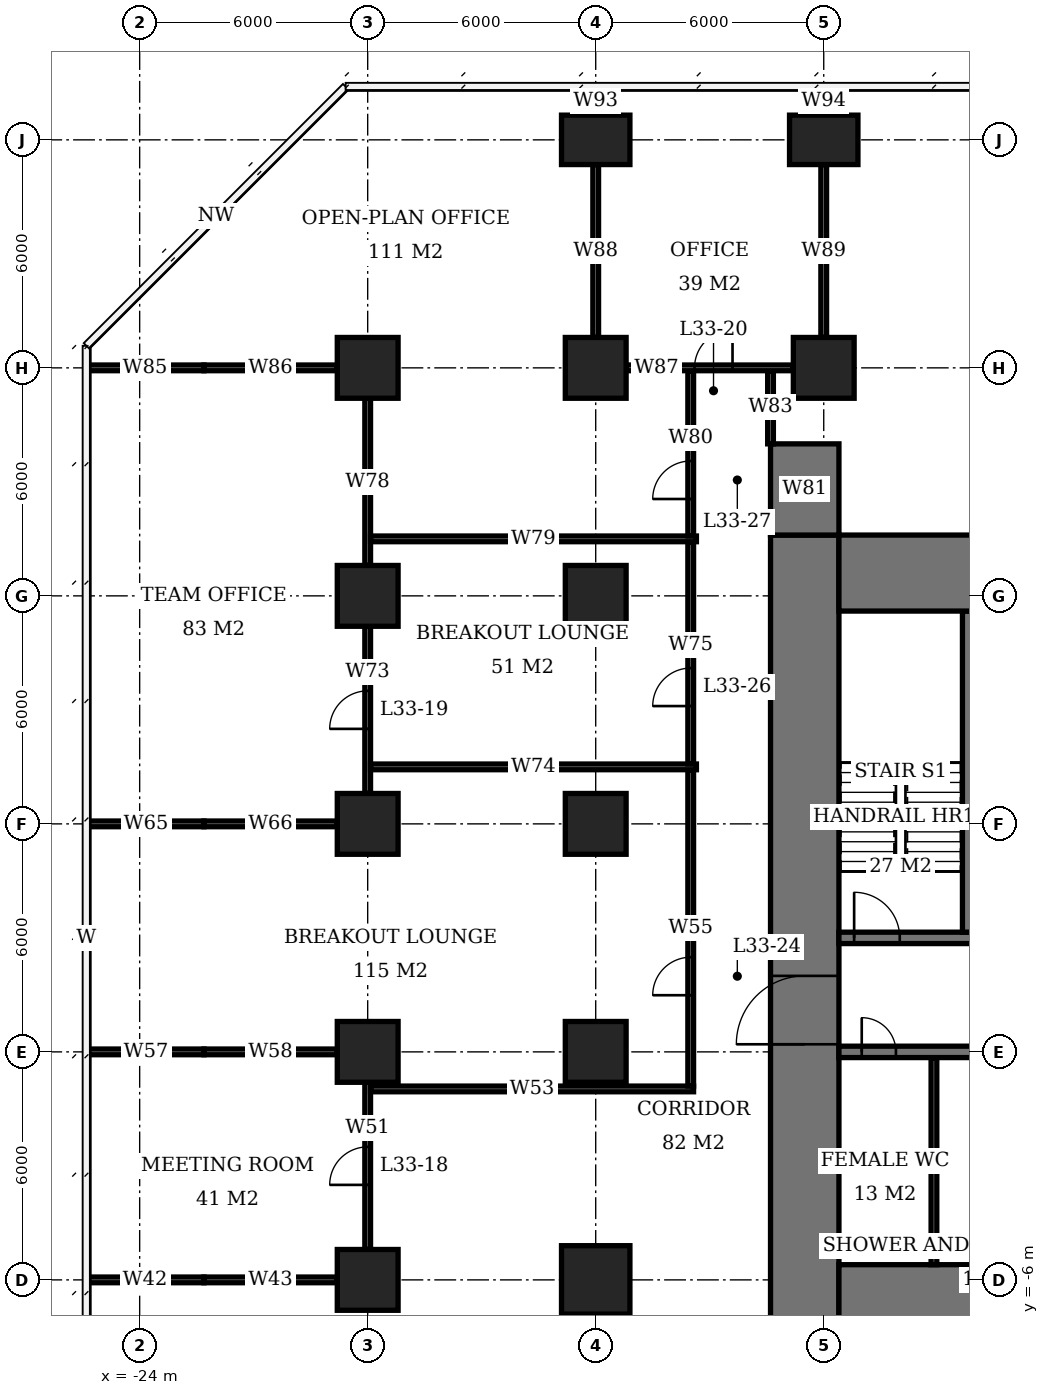
"""IFC4 building model, lengths in metres.
Left out: names, types, materials, properties, quantities, classifications, styles, units other than length and angle.
Written with IfcOpenShell. Run it as: python <this file> out.ifc"""

import sys

from ifc_helpers import new_model, si_unit, direction, frame, frame_2d, origin, origin_2d, place, context, subcontext, project, spatial, rectangle, extrude, element, fill, save


model = new_model("IFC4")
c1 = context("Model", 3, precision=1e-05, world=origin(), true_north=direction((0.0, 1.0)))
c2 = subcontext(c1, "Body", "Model", "MODEL_VIEW")
j1 = project(units=[si_unit("LENGTHUNIT", "METRE"), si_unit("PLANEANGLEUNIT", "RADIAN")], contexts=[c1])
p1 = place(None, origin())
s1 = spatial("IfcSite", under=j1, at=p1, CompositionType="ELEMENT")
p2 = place(p1, origin())
s2 = spatial("IfcBuilding", under=s1, at=p2, CompositionType="ELEMENT")
p3 = place(p2, frame((0.0, 0.0, 136.7)))
s3 = spatial("IfcBuildingStorey", under=s2, at=p3, CompositionType="ELEMENT", Elevation=136.7)
for number, where, z_axis, x_axis in (
    (1, (-18.0, -6.0, 0.0), (0.0, 0.0, 1.0), (1.0, 0.0, 0.0)),
    (2, (-18.0, 0.0, 0.0), (0.0, 0.0, 1.0), (1.0, 0.0, 0.0)),
    (3, (-18.0, 6.0, 0.0), (0.0, 0.0, 1.0), (1.0, 0.0, 0.0)),
    (4, (-18.0, 12.0, 0.0), (0.0, 0.0, 1.0), (1.0, 0.0, 0.0)),
    (5, (-18.0, 18.0, 0.0), (0.0, 0.0, 1.0), (1.0, 0.0, 0.0)),
):
    element("IfcColumn", number, at=place(p3, frame(where, z_axis=z_axis, x_axis=x_axis)), inside=s3, PredefinedType="COLUMN", context=c2, shape_type="SweptSolid", body=[
        extrude(rectangle(XDim=1.6, YDim=1.6, at=origin_2d()), origin(), (0.0, 0.0, 1.0), 3.9),
    ])
p4 = place(p3, frame((-12.0, -6.0, 0.0), z_axis=(0.0, 0.0, 1.0), x_axis=(1.0, 0.0, 0.0)))
e6 = element("IfcColumn", 6, at=p4, inside=s3, PredefinedType="COLUMN", context=c2, shape_type="SweptSolid", body=[
    extrude(rectangle(XDim=1.8, YDim=1.8, at=origin_2d()), origin(), (0.0, 0.0, 1.0), 3.9),
])
for number, where, z_axis, x_axis in (
    (7, (-12.0, 0.0, 0.0), (0.0, 0.0, 1.0), (1.0, 0.0, 0.0)),
    (8, (-12.0, 6.0, 0.0), (0.0, 0.0, 1.0), (1.0, 0.0, 0.0)),
    (9, (-12.0, 12.0, 0.0), (0.0, 0.0, 1.0), (1.0, 0.0, 0.0)),
    (10, (-12.0, 18.0, 0.0), (0.0, 0.0, 1.0), (1.0, 0.0, 0.0)),
):
    element("IfcColumn", number, at=place(p3, frame(where, z_axis=z_axis, x_axis=x_axis)), inside=s3, PredefinedType="COLUMN", context=c2, shape_type="SweptSolid", body=[
        extrude(rectangle(XDim=1.6, YDim=1.6, at=origin_2d()), origin(), (0.0, 0.0, 1.0), 3.9),
    ])
p5 = place(p3, frame((-12.0, 24.0, 0.0), z_axis=(0.0, 0.0, 1.0), x_axis=(1.0, 0.0, 0.0)))
e11 = element("IfcColumn", 11, at=p5, inside=s3, PredefinedType="COLUMN", context=c2, shape_type="SweptSolid", body=[
    extrude(rectangle(XDim=1.8, YDim=1.3, at=origin_2d()), origin(), (0.0, 0.0, 1.0), 3.9),
])
p6 = place(p3, frame((-6.0, 18.0, 0.0), z_axis=(0.0, 0.0, 1.0), x_axis=(1.0, 0.0, 0.0)))
e12 = element("IfcColumn", 12, at=p6, inside=s3, PredefinedType="COLUMN", context=c2, shape_type="SweptSolid", body=[
    extrude(rectangle(XDim=1.6, YDim=1.6, at=origin_2d()), origin(), (0.0, 0.0, 1.0), 3.9),
])
p7 = place(p3, frame((-6.0, 24.0, 0.0), z_axis=(0.0, 0.0, 1.0), x_axis=(1.0, 0.0, 0.0)))
e13 = element("IfcColumn", 13, at=p7, inside=s3, PredefinedType="COLUMN", context=c2, shape_type="SweptSolid", body=[
    extrude(rectangle(XDim=1.8, YDim=1.3, at=origin_2d()), origin(), (0.0, 0.0, 1.0), 3.9),
])
for number, where, z_axis, x_axis in (
    (14, (-5.6, -6.6, 0.0), (0.0, 0.0, 1.0), (1.0, 0.0, 0.0)),
    (15, (-5.6, 12.6, 0.0), (0.0, 0.0, 1.0), (1.0, 0.0, 0.0)),
):
    element("IfcWall", number, at=place(p3, frame(where, z_axis=z_axis, x_axis=x_axis)), inside=s3, PredefinedType="SHEAR", context=c2, shape_type="SweptSolid", body=[
        extrude(rectangle(XDim=23.2, YDim=2.0, at=frame_2d((11.6, 0.0))), origin(), (0.0, 0.0, 1.0), 3.9),
    ])
p8 = place(p3, frame((-6.5, -7.6, 0.0), z_axis=(0.0, 0.0, 1.0), x_axis=(0.0, 1.0, 0.0)))
e16 = element("IfcWall", 16, at=p8, inside=s3, PredefinedType="SHEAR", context=c2, shape_type="SweptSolid", body=[
    extrude(rectangle(XDim=21.2, YDim=1.8, at=frame_2d((10.6, 0.0))), origin(), (0.0, 0.0, 1.0), 3.9),
])
p9 = place(p8, frame((7.8, 0.0, 0.0)))
e17 = element("IfcOpeningElement", 17, at=p9, cuts=e16, PredefinedType="OPENING", context=c2, shape_type="SweptSolid", body=[
    extrude(rectangle(XDim=1.8, YDim=2.4, at=frame_2d((0.9, 1.2))), frame((0.0, 0.91, 0.0), z_axis=(0.0, -1.0, 0.0), x_axis=(1.0, 0.0, 0.0)), (0.0, 0.0, 1.0), 1.82),
])
p10 = place(p3, frame((-6.5, 13.6, 0.0), z_axis=(0.0, 0.0, 1.0), x_axis=(0.0, 1.0, 0.0)))
e18 = element("IfcWall", 18, at=p10, inside=s3, PredefinedType="SHEAR", context=c2, shape_type="SweptSolid", body=[
    extrude(rectangle(XDim=2.4, YDim=1.8, at=frame_2d((1.2, 0.0))), origin(), (0.0, 0.0, 1.0), 3.9),
])
p11 = place(p3, frame((-5.6, 0.0, 0.0), z_axis=(0.0, 0.0, 1.0), x_axis=(1.0, 0.0, 0.0)))
e19 = element("IfcWall", 19, at=p11, inside=s3, PredefinedType="SHEAR", context=c2, shape_type="SweptSolid", body=[
    extrude(rectangle(XDim=17.75, YDim=0.3, at=frame_2d((8.875, 0.0))), origin(), (0.0, 0.0, 1.0), 3.9),
])
p12 = place(p11, frame((0.6, 0.0, 0.0)))
e20 = element("IfcOpeningElement", 20, at=p12, cuts=e19, PredefinedType="OPENING", context=c2, shape_type="SweptSolid", body=[
    extrude(rectangle(XDim=0.9, YDim=2.1, at=frame_2d((0.45, 1.05))), frame((0.0, 0.16, 0.0), z_axis=(0.0, -1.0, 0.0), x_axis=(1.0, 0.0, 0.0)), (0.0, 0.0, 1.0), 0.32),
])
p13 = place(p11, frame((3.7, 0.0, 0.0)))
e21 = element("IfcOpeningElement", 21, at=p13, cuts=e19, PredefinedType="OPENING", context=c2, shape_type="SweptSolid", body=[
    extrude(rectangle(XDim=0.9, YDim=2.1, at=frame_2d((0.45, 1.05))), frame((0.0, 0.16, 0.0), z_axis=(0.0, -1.0, 0.0), x_axis=(1.0, 0.0, 0.0)), (0.0, 0.0, 1.0), 0.32),
])
p14 = place(p11, frame((6.55, 0.0, 0.0)))
e22 = element("IfcOpeningElement", 22, at=p14, cuts=e19, PredefinedType="OPENING", context=c2, shape_type="SweptSolid", body=[
    extrude(rectangle(XDim=1.1, YDim=2.1, at=frame_2d((0.55, 1.05))), frame((0.0, 0.16, 0.0), z_axis=(0.0, -1.0, 0.0), x_axis=(1.0, 0.0, 0.0)), (0.0, 0.0, 1.0), 0.32),
])
p15 = place(p11, frame((9.55, 0.0, 0.0)))
e23 = element("IfcOpeningElement", 23, at=p15, cuts=e19, PredefinedType="OPENING", context=c2, shape_type="SweptSolid", body=[
    extrude(rectangle(XDim=1.1, YDim=2.1, at=frame_2d((0.55, 1.05))), frame((0.0, 0.16, 0.0), z_axis=(0.0, -1.0, 0.0), x_axis=(1.0, 0.0, 0.0)), (0.0, 0.0, 1.0), 0.32),
])
p16 = place(p3, frame((-5.6, 3.0, 0.0), z_axis=(0.0, 0.0, 1.0), x_axis=(1.0, 0.0, 0.0)))
e24 = element("IfcWall", 24, at=p16, inside=s3, PredefinedType="SHEAR", context=c2, shape_type="SweptSolid", body=[
    extrude(rectangle(XDim=5.45, YDim=0.3, at=frame_2d((2.725, 0.0))), origin(), (0.0, 0.0, 1.0), 3.9),
])
p17 = place(p16, frame((0.4, 0.0, 0.0)))
e25 = element("IfcOpeningElement", 25, at=p17, cuts=e24, PredefinedType="OPENING", context=c2, shape_type="SweptSolid", body=[
    extrude(rectangle(XDim=1.2, YDim=2.1, at=frame_2d((0.6, 1.05))), frame((0.0, 0.16, 0.0), z_axis=(0.0, -1.0, 0.0), x_axis=(1.0, 0.0, 0.0)), (0.0, 0.0, 1.0), 0.32),
])
p18 = place(p16, frame((3.95, 0.0, 0.0)))
e26 = element("IfcOpeningElement", 26, at=p18, cuts=e24, PredefinedType="OPENING", context=c2, shape_type="SweptSolid", body=[
    extrude(rectangle(XDim=0.9, YDim=2.1, at=frame_2d((0.45, 1.05))), frame((0.0, 0.16, 0.0), z_axis=(0.0, -1.0, 0.0), x_axis=(1.0, 0.0, 0.0)), (0.0, 0.0, 1.0), 0.32),
])
p19 = place(p3, frame((-2.2, 3.15, 0.0), z_axis=(0.0, 0.0, 1.0), x_axis=(0.0, 1.0, 0.0)))
e27 = element("IfcWall", 27, at=p19, inside=s3, PredefinedType="SHEAR", context=c2, shape_type="SweptSolid", body=[
    extrude(rectangle(XDim=8.45, YDim=0.3, at=frame_2d((4.225, 0.0))), origin(), (0.0, 0.0, 1.0), 3.9),
])
p20 = place(p3, frame((-3.1, -5.6, 0.0), z_axis=(0.0, 0.0, 1.0), x_axis=(0.0, 1.0, 0.0)))
e28 = element("IfcWall", 28, at=p20, inside=s3, PredefinedType="PLUMBINGWALL", context=c2, shape_type="SweptSolid", body=[
    extrude(rectangle(XDim=5.45, YDim=0.15, at=frame_2d((2.725, 0.0))), origin(), (0.0, 0.0, 1.0), 3.65),
])
p21 = place(p3, frame((-25.4, -6.0, 0.0), z_axis=(0.0, 0.0, 1.0), x_axis=(1.0, 0.0, 0.0)))
e29 = element("IfcWall", 29, at=p21, inside=s3, PredefinedType="PARTITIONING", context=c2, shape_type="SweptSolid", body=[
    extrude(rectangle(XDim=3.09, YDim=0.15, at=frame_2d((1.545, 0.0))), origin(), (0.0, 0.0, 1.0), 3.65),
])
p22 = place(p3, frame((-22.31, -6.0, 0.0), z_axis=(0.0, 0.0, 1.0), x_axis=(1.0, 0.0, 0.0)))
e30 = element("IfcWall", 30, at=p22, inside=s3, PredefinedType="PARTITIONING", context=c2, shape_type="SweptSolid", body=[
    extrude(rectangle(XDim=3.51, YDim=0.15, at=frame_2d((1.755, 0.0))), origin(), (0.0, 0.0, 1.0), 2.65),
])
p23 = place(p3, frame((-25.35, 0.0, 0.0), z_axis=(0.0, 0.0, 1.0), x_axis=(1.0, 0.0, 0.0)))
e31 = element("IfcWall", 31, at=p23, inside=s3, PredefinedType="PARTITIONING", context=c2, shape_type="SweptSolid", body=[
    extrude(rectangle(XDim=3.04, YDim=0.15, at=frame_2d((1.52, 0.0))), origin(), (0.0, 0.0, 1.0), 3.65),
])
p24 = place(p3, frame((-22.31, 0.0, 0.0), z_axis=(0.0, 0.0, 1.0), x_axis=(1.0, 0.0, 0.0)))
e32 = element("IfcWall", 32, at=p24, inside=s3, PredefinedType="PARTITIONING", context=c2, shape_type="SweptSolid", body=[
    extrude(rectangle(XDim=3.51, YDim=0.15, at=frame_2d((1.755, 0.0))), origin(), (0.0, 0.0, 1.0), 2.65),
])
p25 = place(p3, frame((-25.35, 6.0, 0.0), z_axis=(0.0, 0.0, 1.0), x_axis=(1.0, 0.0, 0.0)))
e33 = element("IfcWall", 33, at=p25, inside=s3, PredefinedType="PARTITIONING", context=c2, shape_type="SweptSolid", body=[
    extrude(rectangle(XDim=3.04, YDim=0.15, at=frame_2d((1.52, 0.0))), origin(), (0.0, 0.0, 1.0), 3.65),
])
p26 = place(p3, frame((-22.31, 6.0, 0.0), z_axis=(0.0, 0.0, 1.0), x_axis=(1.0, 0.0, 0.0)))
e34 = element("IfcWall", 34, at=p26, inside=s3, PredefinedType="PARTITIONING", context=c2, shape_type="SweptSolid", body=[
    extrude(rectangle(XDim=3.51, YDim=0.15, at=frame_2d((1.755, 0.0))), origin(), (0.0, 0.0, 1.0), 2.65),
])
p27 = place(p3, frame((-25.4, 18.0, 0.0), z_axis=(0.0, 0.0, 1.0), x_axis=(1.0, 0.0, 0.0)))
e35 = element("IfcWall", 35, at=p27, inside=s3, PredefinedType="PARTITIONING", context=c2, shape_type="SweptSolid", body=[
    extrude(rectangle(XDim=3.09, YDim=0.15, at=frame_2d((1.545, 0.0))), origin(), (0.0, 0.0, 1.0), 3.65),
])
p28 = place(p3, frame((-22.31, 18.0, 0.0), z_axis=(0.0, 0.0, 1.0), x_axis=(1.0, 0.0, 0.0)))
e36 = element("IfcWall", 36, at=p28, inside=s3, PredefinedType="PARTITIONING", context=c2, shape_type="SweptSolid", body=[
    extrude(rectangle(XDim=3.51, YDim=0.15, at=frame_2d((1.755, 0.0))), origin(), (0.0, 0.0, 1.0), 2.65),
])
p29 = place(p3, frame((-11.2, 18.0, 0.0), z_axis=(0.0, 0.0, 1.0), x_axis=(1.0, 0.0, 0.0)))
e37 = element("IfcWall", 37, at=p29, inside=s3, PredefinedType="PARTITIONING", context=c2, shape_type="SweptSolid", body=[
    extrude(rectangle(XDim=4.4, YDim=0.15, at=frame_2d((2.2, 0.0))), origin(), (0.0, 0.0, 1.0), 3.65),
])
p30 = place(p29, frame((1.8, 0.0, 0.0)))
e38 = element("IfcOpeningElement", 38, at=p30, cuts=e37, PredefinedType="OPENING", context=c2, shape_type="SweptSolid", body=[
    extrude(rectangle(XDim=1.0, YDim=2.1, at=frame_2d((0.5, 1.05))), frame((0.0, 0.085, 0.0), z_axis=(0.0, -1.0, 0.0), x_axis=(1.0, 0.0, 0.0)), (0.0, 0.0, 1.0), 0.17),
])
p31 = place(p3, frame((-18.0, -5.2, 0.0), z_axis=(0.0, 0.0, 1.0), x_axis=(0.0, 1.0, 0.0)))
e39 = element("IfcWall", 39, at=p31, inside=s3, PredefinedType="PARTITIONING", context=c2, shape_type="SweptSolid", body=[
    extrude(rectangle(XDim=4.4, YDim=0.15, at=frame_2d((2.2, 0.0))), origin(), (0.0, 0.0, 1.0), 3.65),
])
p32 = place(p31, frame((1.7, 0.0, 0.0)))
e40 = element("IfcOpeningElement", 40, at=p32, cuts=e39, PredefinedType="OPENING", context=c2, shape_type="SweptSolid", body=[
    extrude(rectangle(XDim=1.0, YDim=2.1, at=frame_2d((0.5, 1.05))), frame((0.0, 0.085, 0.0), z_axis=(0.0, -1.0, 0.0), x_axis=(1.0, 0.0, 0.0)), (0.0, 0.0, 1.0), 0.17),
])
p33 = place(p3, frame((-18.0, 6.8, 0.0), z_axis=(0.0, 0.0, 1.0), x_axis=(0.0, 1.0, 0.0)))
e41 = element("IfcWall", 41, at=p33, inside=s3, PredefinedType="PARTITIONING", context=c2, shape_type="SweptSolid", body=[
    extrude(rectangle(XDim=4.4, YDim=0.15, at=frame_2d((2.2, 0.0))), origin(), (0.0, 0.0, 1.0), 3.65),
])
p34 = place(p33, frame((1.7, 0.0, 0.0)))
e42 = element("IfcOpeningElement", 42, at=p34, cuts=e41, PredefinedType="OPENING", context=c2, shape_type="SweptSolid", body=[
    extrude(rectangle(XDim=1.0, YDim=2.1, at=frame_2d((0.5, 1.05))), frame((0.0, 0.085, 0.0), z_axis=(0.0, -1.0, 0.0), x_axis=(1.0, 0.0, 0.0)), (0.0, 0.0, 1.0), 0.17),
])
p35 = place(p3, frame((-18.0, 12.8, 0.0), z_axis=(0.0, 0.0, 1.0), x_axis=(0.0, 1.0, 0.0)))
e43 = element("IfcWall", 43, at=p35, inside=s3, PredefinedType="PARTITIONING", context=c2, shape_type="SweptSolid", body=[
    extrude(rectangle(XDim=4.4, YDim=0.15, at=frame_2d((2.2, 0.0))), origin(), (0.0, 0.0, 1.0), 3.65),
])
p36 = place(p3, frame((-12.0, 18.8, 0.0), z_axis=(0.0, 0.0, 1.0), x_axis=(0.0, 1.0, 0.0)))
e44 = element("IfcWall", 44, at=p36, inside=s3, PredefinedType="PARTITIONING", context=c2, shape_type="SweptSolid", body=[
    extrude(rectangle(XDim=4.55, YDim=0.15, at=frame_2d((2.275, 0.0))), origin(), (0.0, 0.0, 1.0), 3.65),
])
p37 = place(p3, frame((-12.0, 24.65, 0.0), z_axis=(0.0, 0.0, 1.0), x_axis=(0.0, 1.0, 0.0)))
e45 = element("IfcWall", 45, at=p37, inside=s3, PredefinedType="PARTITIONING", context=c2, shape_type="SweptSolid", body=[
    extrude(rectangle(XDim=0.75, YDim=0.15, at=frame_2d((0.375, 0.0))), origin(), (0.0, 0.0, 1.0), 3.65),
])
p38 = place(p3, frame((-6.0, 18.8, 0.0), z_axis=(0.0, 0.0, 1.0), x_axis=(0.0, 1.0, 0.0)))
e46 = element("IfcWall", 46, at=p38, inside=s3, PredefinedType="PARTITIONING", context=c2, shape_type="SweptSolid", body=[
    extrude(rectangle(XDim=4.55, YDim=0.15, at=frame_2d((2.275, 0.0))), origin(), (0.0, 0.0, 1.0), 3.65),
])
p39 = place(p3, frame((-6.0, 24.65, 0.0), z_axis=(0.0, 0.0, 1.0), x_axis=(0.0, 1.0, 0.0)))
e47 = element("IfcWall", 47, at=p39, inside=s3, PredefinedType="PARTITIONING", context=c2, shape_type="SweptSolid", body=[
    extrude(rectangle(XDim=0.75, YDim=0.15, at=frame_2d((0.375, 0.0))), origin(), (0.0, 0.0, 1.0), 3.65),
])
p40 = place(p3, frame((-17.925, -0.975, 0.0), z_axis=(0.0, 0.0, 1.0), x_axis=(1.0, 0.0, 0.0)))
e48 = element("IfcWall", 48, at=p40, inside=s3, PredefinedType="PARTITIONING", context=c2, shape_type="SweptSolid", body=[
    extrude(rectangle(XDim=8.5, YDim=0.15, at=frame_2d((4.25, 0.0))), origin(), (0.0, 0.0, 1.0), 3.65),
])
for number, where, z_axis, x_axis in (
    (49, (-17.925, 7.5, 0.0), (0.0, 0.0, 1.0), (1.0, 0.0, 0.0)),
    (50, (-17.925, 13.5, 0.0), (0.0, 0.0, 1.0), (1.0, 0.0, 0.0)),
):
    element("IfcWall", number, at=place(p3, frame(where, z_axis=z_axis, x_axis=x_axis)), inside=s3, PredefinedType="PARTITIONING", context=c2, shape_type="SweptSolid", body=[
        extrude(rectangle(XDim=8.575, YDim=0.15, at=frame_2d((4.288, 0.0))), origin(), (0.0, 0.0, 1.0), 3.65),
    ])
p41 = place(p3, frame((-9.5, -0.9, 0.0), z_axis=(0.0, 0.0, 1.0), x_axis=(0.0, 1.0, 0.0)))
e51 = element("IfcWall", 51, at=p41, inside=s3, PredefinedType="PARTITIONING", context=c2, shape_type="SweptSolid", body=[
    extrude(rectangle(XDim=8.325, YDim=0.15, at=frame_2d((4.163, 0.0))), origin(), (0.0, 0.0, 1.0), 3.65),
])
p42 = place(p41, frame((2.391, 0.0, 0.0)))
e52 = element("IfcOpeningElement", 52, at=p42, cuts=e51, PredefinedType="OPENING", context=c2, shape_type="SweptSolid", body=[
    extrude(rectangle(XDim=1.0, YDim=2.1, at=frame_2d((0.5, 1.05))), frame((0.0, 0.085, 0.0), z_axis=(0.0, -1.0, 0.0), x_axis=(1.0, 0.0, 0.0)), (0.0, 0.0, 1.0), 0.17),
])
p43 = place(p3, frame((-9.5, 7.575, 0.0), z_axis=(0.0, 0.0, 1.0), x_axis=(0.0, 1.0, 0.0)))
e53 = element("IfcWall", 53, at=p43, inside=s3, PredefinedType="PARTITIONING", context=c2, shape_type="SweptSolid", body=[
    extrude(rectangle(XDim=5.85, YDim=0.15, at=frame_2d((2.925, 0.0))), origin(), (0.0, 0.0, 1.0), 3.65),
])
p44 = place(p43, frame((1.525, 0.0, 0.0)))
e54 = element("IfcOpeningElement", 54, at=p44, cuts=e53, PredefinedType="OPENING", context=c2, shape_type="SweptSolid", body=[
    extrude(rectangle(XDim=1.0, YDim=2.1, at=frame_2d((0.5, 1.05))), frame((0.0, 0.085, 0.0), z_axis=(0.0, -1.0, 0.0), x_axis=(1.0, 0.0, 0.0)), (0.0, 0.0, 1.0), 0.17),
])
p45 = place(p3, frame((-9.5, 13.575, 0.0), z_axis=(0.0, 0.0, 1.0), x_axis=(0.0, 1.0, 0.0)))
e55 = element("IfcWall", 55, at=p45, inside=s3, PredefinedType="PARTITIONING", context=c2, shape_type="SweptSolid", body=[
    extrude(rectangle(XDim=4.35, YDim=0.15, at=frame_2d((2.175, 0.0))), origin(), (0.0, 0.0, 1.0), 3.65),
])
p46 = place(p45, frame((0.974, 0.0, 0.0)))
e56 = element("IfcOpeningElement", 56, at=p46, cuts=e55, PredefinedType="OPENING", context=c2, shape_type="SweptSolid", body=[
    extrude(rectangle(XDim=1.0, YDim=2.1, at=frame_2d((0.5, 1.05))), frame((0.0, 0.085, 0.0), z_axis=(0.0, -1.0, 0.0), x_axis=(1.0, 0.0, 0.0)), (0.0, 0.0, 1.0), 0.17),
])
p47 = place(p3, frame((-7.4, 16.0, 0.0), z_axis=(0.0, 0.0, 1.0), x_axis=(0.0, 1.0, 0.0)))
e57 = element("IfcWall", 57, at=p47, inside=s3, PredefinedType="PARTITIONING", context=c2, shape_type="SweptSolid", body=[
    extrude(rectangle(XDim=1.925, YDim=0.15, at=frame_2d((0.962, 0.0))), origin(), (0.0, 0.0, 1.0), 3.65),
])
p48 = place(p9, origin())
e58 = element("IfcDoor", 58, at=p48, inside=s3, OperationType="DOUBLE_DOOR_SINGLE_SWING", PredefinedType="DOOR", context=c2, shape_type="SweptSolid", body=[
    extrude(rectangle(XDim=1.8, YDim=2.4, at=frame_2d((0.9, 1.2))), frame((0.0, 0.025, 0.0), z_axis=(0.0, -1.0, 0.0), x_axis=(1.0, 0.0, 0.0)), (0.0, 0.0, 1.0), 0.05),
])
fill(e17, e58)
p49 = place(p17, origin())
e59 = element("IfcDoor", 59, at=p49, inside=s3, OperationType="SINGLE_SWING_LEFT", PredefinedType="DOOR", context=c2, shape_type="SweptSolid", body=[
    extrude(rectangle(XDim=1.2, YDim=2.1, at=frame_2d((0.6, 1.05))), frame((0.0, 0.025, 0.0), z_axis=(0.0, -1.0, 0.0), x_axis=(1.0, 0.0, 0.0)), (0.0, 0.0, 1.0), 0.05),
])
fill(e25, e59)
p50 = place(p12, origin())
e60 = element("IfcDoor", 60, at=p50, inside=s3, OperationType="SINGLE_SWING_LEFT", PredefinedType="DOOR", context=c2, shape_type="SweptSolid", body=[
    extrude(rectangle(XDim=0.9, YDim=2.1, at=frame_2d((0.45, 1.05))), frame((0.0, 0.025, 0.0), z_axis=(0.0, -1.0, 0.0), x_axis=(1.0, 0.0, 0.0)), (0.0, 0.0, 1.0), 0.05),
])
fill(e20, e60)
p51 = place(p32, origin())
e61 = element("IfcDoor", 61, at=p51, inside=s3, OperationType="SINGLE_SWING_LEFT", PredefinedType="DOOR", context=c2, shape_type="SweptSolid", body=[
    extrude(rectangle(XDim=1.0, YDim=2.1, at=frame_2d((0.5, 1.05))), frame((0.0, 0.025, 0.0), z_axis=(0.0, -1.0, 0.0), x_axis=(1.0, 0.0, 0.0)), (0.0, 0.0, 1.0), 0.05),
])
fill(e40, e61)
p52 = place(p34, origin())
e62 = element("IfcDoor", 62, at=p52, inside=s3, OperationType="SINGLE_SWING_LEFT", PredefinedType="DOOR", context=c2, shape_type="SweptSolid", body=[
    extrude(rectangle(XDim=1.0, YDim=2.1, at=frame_2d((0.5, 1.05))), frame((0.0, 0.025, 0.0), z_axis=(0.0, -1.0, 0.0), x_axis=(1.0, 0.0, 0.0)), (0.0, 0.0, 1.0), 0.05),
])
fill(e42, e62)
p53 = place(p30, origin())
e63 = element("IfcDoor", 63, at=p53, inside=s3, OperationType="SINGLE_SWING_RIGHT", PredefinedType="DOOR", context=c2, shape_type="SweptSolid", body=[
    extrude(rectangle(XDim=1.0, YDim=2.1, at=frame_2d((0.5, 1.05))), frame((0.0, 0.025, 0.0), z_axis=(0.0, -1.0, 0.0), x_axis=(1.0, 0.0, 0.0)), (0.0, 0.0, 1.0), 0.05),
])
fill(e38, e63)
p54 = place(p42, origin())
e64 = element("IfcDoor", 64, at=p54, inside=s3, OperationType="SINGLE_SWING_LEFT", PredefinedType="DOOR", context=c2, shape_type="SweptSolid", body=[
    extrude(rectangle(XDim=1.0, YDim=2.1, at=frame_2d((0.5, 1.05))), frame((0.0, 0.025, 0.0), z_axis=(0.0, -1.0, 0.0), x_axis=(1.0, 0.0, 0.0)), (0.0, 0.0, 1.0), 0.05),
])
fill(e52, e64)
p55 = place(p44, origin())
e65 = element("IfcDoor", 65, at=p55, inside=s3, OperationType="SINGLE_SWING_LEFT", PredefinedType="DOOR", context=c2, shape_type="SweptSolid", body=[
    extrude(rectangle(XDim=1.0, YDim=2.1, at=frame_2d((0.5, 1.05))), frame((0.0, 0.025, 0.0), z_axis=(0.0, -1.0, 0.0), x_axis=(1.0, 0.0, 0.0)), (0.0, 0.0, 1.0), 0.05),
])
fill(e54, e65)
p56 = place(p46, origin())
e66 = element("IfcDoor", 66, at=p56, inside=s3, OperationType="SINGLE_SWING_LEFT", PredefinedType="DOOR", context=c2, shape_type="SweptSolid", body=[
    extrude(rectangle(XDim=1.0, YDim=2.1, at=frame_2d((0.5, 1.05))), frame((0.0, 0.025, 0.0), z_axis=(0.0, -1.0, 0.0), x_axis=(1.0, 0.0, 0.0)), (0.0, 0.0, 1.0), 0.05),
])
fill(e56, e66)
save(model, sys.argv[1])
